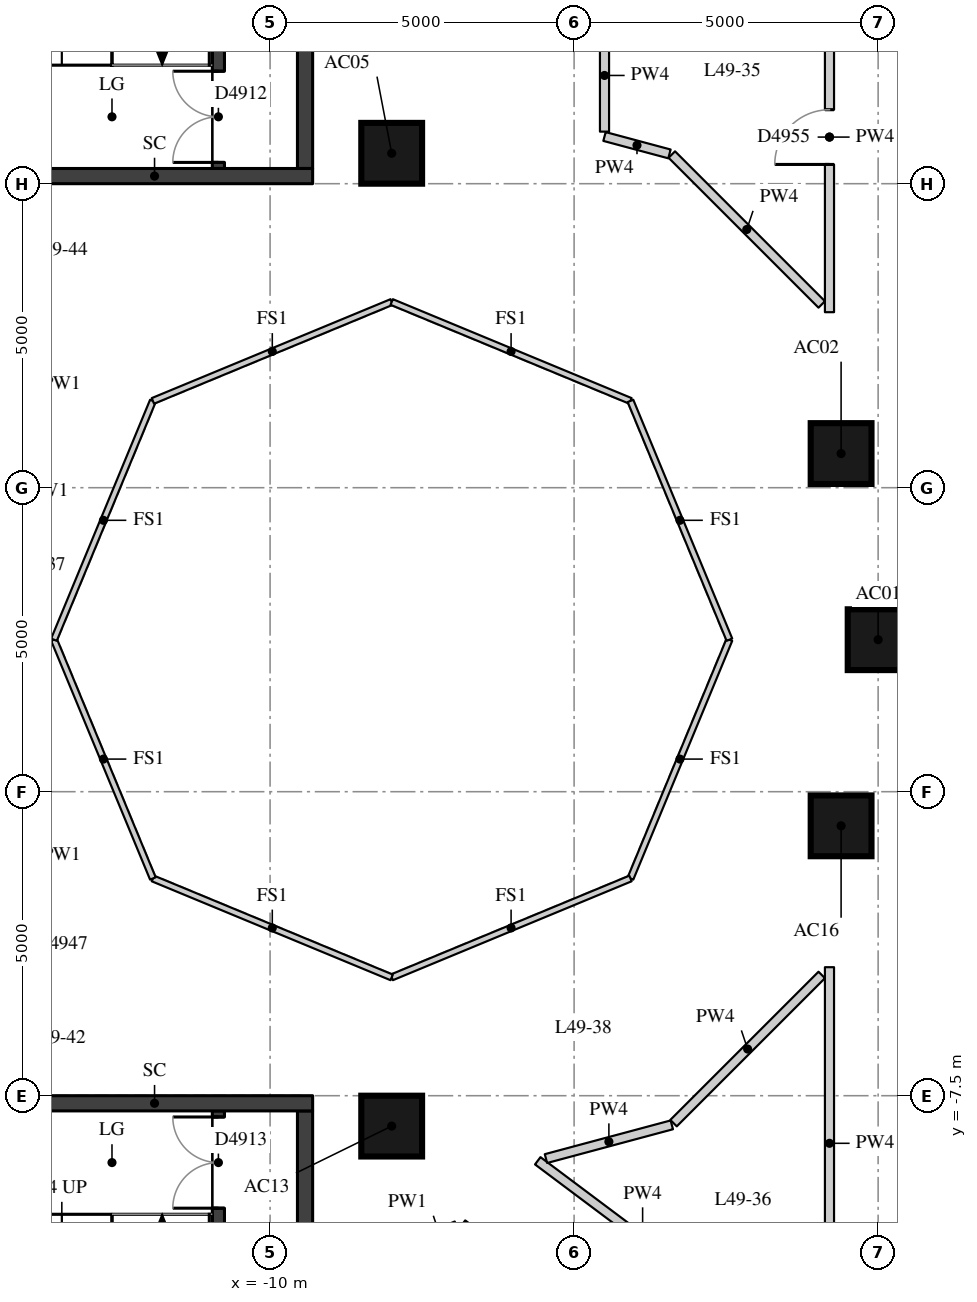
"""IFC4 building model, lengths in metres.
Left out: names, types, materials, properties, quantities, classifications, styles, units other than length and angle.
Written with IfcOpenShell. Run it as: python <this file> out.ifc"""

import sys

from ifc_helpers import new_model, si_unit, direction, frame, frame_2d, origin, origin_2d, place, context, subcontext, project, spatial, rectangle, extrude, element, fill, save


model = new_model("IFC4")
c1 = context("Model", 3, precision=1e-05, world=origin(), true_north=direction((0.0, 1.0)))
c2 = subcontext(c1, "Body", "Model", "MODEL_VIEW")
j1 = project(units=[si_unit("LENGTHUNIT", "METRE"), si_unit("PLANEANGLEUNIT", "RADIAN")], contexts=[c1])
p1 = place(None, origin())
s1 = spatial("IfcSite", under=j1, at=p1, CompositionType="ELEMENT")
p2 = place(p1, origin())
s2 = spatial("IfcBuilding", under=s1, at=p2, CompositionType="ELEMENT")
p3 = place(p2, frame((0.0, 0.0, 174.8)))
s3 = spatial("IfcBuildingStorey", under=s2, at=p3, CompositionType="ELEMENT", Elevation=174.8)
for number, where, z_axis, x_axis in (
    (1, (0.0, 0.0, 0.0), (0.0, 0.0, 1.0), (1.0, 0.0, 0.0)),
    (2, (-0.609, 3.062, 0.0), (0.0, 0.0, 1.0), (1.0, 0.0, 0.0)),
    (3, (-8.0, 8.0, 0.0), (0.0, 0.0, 1.0), (1.0, 0.0, 0.0)),
    (4, (-8.0, -8.0, 0.0), (0.0, 0.0, 1.0), (1.0, 0.0, 0.0)),
    (5, (-0.609, -3.062, 0.0), (0.0, 0.0, 1.0), (1.0, 0.0, 0.0)),
):
    element("IfcColumn", number, at=place(p3, frame(where, z_axis=z_axis, x_axis=x_axis)), inside=s3, PredefinedType="COLUMN", context=c2, shape_type="SweptSolid", body=[
        extrude(rectangle(XDim=1.0, YDim=1.0, at=origin_2d()), origin(), (0.0, 0.0, 1.0), 3.3),
    ])
p4 = place(p3, frame((-10.85, 7.75, 0.0), z_axis=(0.0, 0.0, 1.0), x_axis=(0.0, 1.0, 0.0)))
e6 = element("IfcWall", 6, at=p4, inside=s3, PredefinedType="SHEAR", context=c2, shape_type="SweptSolid", body=[
    extrude(rectangle(XDim=6.0, YDim=0.2, at=frame_2d((3.0, 0.0))), origin(), (0.0, 0.0, 1.0), 3.02),
])
p5 = place(p4, frame((0.1, 0.0, 0.0)))
e7 = element("IfcOpeningElement", 7, at=p5, cuts=e6, PredefinedType="OPENING", context=c2, shape_type="SweptSolid", body=[
    extrude(rectangle(XDim=1.5, YDim=2.1, at=frame_2d((0.75, 1.05))), frame((0.0, 0.11, 0.0), z_axis=(0.0, -1.0, 0.0), x_axis=(1.0, 0.0, 0.0)), (0.0, 0.0, 1.0), 0.22),
])
p6 = place(p3, frame((-10.85, -13.75, 0.0), z_axis=(0.0, 0.0, 1.0), x_axis=(0.0, 1.0, 0.0)))
e8 = element("IfcWall", 8, at=p6, inside=s3, PredefinedType="SHEAR", context=c2, shape_type="SweptSolid", body=[
    extrude(rectangle(XDim=6.0, YDim=0.2, at=frame_2d((3.0, 0.0))), origin(), (0.0, 0.0, 1.0), 3.02),
])
p7 = place(p6, frame((4.4, 0.0, 0.0)))
e9 = element("IfcOpeningElement", 9, at=p7, cuts=e8, PredefinedType="OPENING", context=c2, shape_type="SweptSolid", body=[
    extrude(rectangle(XDim=1.5, YDim=2.1, at=frame_2d((0.75, 1.05))), frame((0.0, 0.11, 0.0), z_axis=(0.0, -1.0, 0.0), x_axis=(1.0, 0.0, 0.0)), (0.0, 0.0, 1.0), 0.22),
])
p8 = place(p3, frame((-9.425, 7.75, -0.28), z_axis=(0.0, 0.0, 1.0), x_axis=(0.0, 1.0, 0.0)))
e10 = element("IfcWall", 10, at=p8, inside=s3, PredefinedType="SHEAR", context=c2, shape_type="SweptSolid", body=[
    extrude(rectangle(XDim=6.0, YDim=0.25, at=frame_2d((3.0, 0.0))), origin(), (0.0, 0.0, 1.0), 3.3),
])
p9 = place(p8, frame((2.1, 0.0, 0.28)))
e11 = element("IfcOpeningElement", 11, at=p9, cuts=e10, PredefinedType="OPENING", context=c2, shape_type="SweptSolid", body=[
    extrude(rectangle(XDim=1.5, YDim=2.1, at=frame_2d((0.75, 1.05))), frame((0.0, 0.135, 0.0), z_axis=(0.0, -1.0, 0.0), x_axis=(1.0, 0.0, 0.0)), (0.0, 0.0, 1.0), 0.27),
])
p10 = place(p3, frame((-14.5, 7.625, -0.28), z_axis=(0.0, 0.0, 1.0), x_axis=(1.0, 0.0, 0.0)))
e12 = element("IfcWall", 12, at=p10, inside=s3, PredefinedType="SHEAR", context=c2, shape_type="SweptSolid", body=[
    extrude(rectangle(XDim=5.2, YDim=0.25, at=frame_2d((2.6, 0.0))), origin(), (0.0, 0.0, 1.0), 3.3),
])
p11 = place(p3, frame((-9.425, -13.75, -0.28), z_axis=(0.0, 0.0, 1.0), x_axis=(0.0, 1.0, 0.0)))
e13 = element("IfcWall", 13, at=p11, inside=s3, PredefinedType="SHEAR", context=c2, shape_type="SweptSolid", body=[
    extrude(rectangle(XDim=6.0, YDim=0.25, at=frame_2d((3.0, 0.0))), origin(), (0.0, 0.0, 1.0), 3.3),
])
p12 = place(p11, frame((2.4, 0.0, 0.28)))
e14 = element("IfcOpeningElement", 14, at=p12, cuts=e13, PredefinedType="OPENING", context=c2, shape_type="SweptSolid", body=[
    extrude(rectangle(XDim=1.5, YDim=2.1, at=frame_2d((0.75, 1.05))), frame((0.0, 0.135, 0.0), z_axis=(0.0, -1.0, 0.0), x_axis=(1.0, 0.0, 0.0)), (0.0, 0.0, 1.0), 0.27),
])
p13 = place(p3, frame((-14.5, -7.625, -0.28), z_axis=(0.0, 0.0, 1.0), x_axis=(1.0, 0.0, 0.0)))
e15 = element("IfcWall", 15, at=p13, inside=s3, PredefinedType="SHEAR", context=c2, shape_type="SweptSolid", body=[
    extrude(rectangle(XDim=5.2, YDim=0.25, at=frame_2d((2.6, 0.0))), origin(), (0.0, 0.0, 1.0), 3.3),
])
p14 = place(p3, frame((-2.698, -12.744, 0.0), z_axis=(0.0, 0.0, 1.0), x_axis=(-0.800208812098, 0.59972148289, 0.0)))
e16 = element("IfcWall", 16, at=p14, inside=s3, PredefinedType="PARTITIONING", context=c2, shape_type="SweptSolid", body=[
    extrude(rectangle(XDim=5.19, YDim=0.2, at=frame_2d((2.595, 0.0))), origin(), (0.0, 0.0, 1.0), 3.02),
])
p15 = place(p3, frame((-6.925, -9.661, 0.0), z_axis=(0.0, 0.0, 1.0), x_axis=(-0.923725195793, -0.383055821855, 0.0)))
e17 = element("IfcWall", 17, at=p15, inside=s3, PredefinedType="PARTITIONING", context=c2, shape_type="SweptSolid", body=[
    extrude(rectangle(XDim=0.623, YDim=0.2, at=frame_2d((0.312, 0.0))), origin(), (0.0, 0.0, 1.0), 3.02),
])
p16 = place(p3, frame((-0.8, 11.147, 0.0), z_axis=(0.0, 0.0, 1.0), x_axis=(0.0, -1.0, 0.0)))
e18 = element("IfcWall", 18, at=p16, inside=s3, PredefinedType="PARTITIONING", context=c2, shape_type="SweptSolid", body=[
    extrude(rectangle(XDim=5.76, YDim=0.15, at=frame_2d((2.88, 0.0))), origin(), (0.0, 0.0, 1.0), 3.02),
])
p17 = place(p16, frame((2.43, 0.0, 0.0)))
e19 = element("IfcOpeningElement", 19, at=p17, cuts=e18, PredefinedType="OPENING", context=c2, shape_type="SweptSolid", body=[
    extrude(rectangle(XDim=0.9, YDim=2.1, at=frame_2d((0.45, 1.05))), frame((0.0, 0.085, 0.0), z_axis=(0.0, -1.0, 0.0), x_axis=(1.0, 0.0, 0.0)), (0.0, 0.0, 1.0), 0.17),
])
p18 = place(p3, frame((-0.927, 5.514, 0.0), z_axis=(0.0, 0.0, 1.0), x_axis=(-0.707106781187, 0.707106781187, 0.0)))
e20 = element("IfcWall", 20, at=p18, inside=s3, PredefinedType="PARTITIONING", context=c2, shape_type="SweptSolid", body=[
    extrude(rectangle(XDim=3.487, YDim=0.15, at=frame_2d((1.743, 0.0))), origin(), (0.0, 0.0, 1.0), 3.02),
])
p19 = place(p3, frame((-3.432, 7.99, 0.0), z_axis=(0.0, 0.0, 1.0), x_axis=(-0.965900750832, 0.258912609855, 0.0)))
e21 = element("IfcWall", 21, at=p19, inside=s3, PredefinedType="PARTITIONING", context=c2, shape_type="SweptSolid", body=[
    extrude(rectangle(XDim=1.106, YDim=0.15, at=frame_2d((0.553, 0.0))), origin(), (0.0, 0.0, 1.0), 3.02),
])
p20 = place(p3, frame((-4.5, 8.356, 0.0), z_axis=(0.0, 0.0, 1.0), x_axis=(0.0, 1.0, 0.0)))
e22 = element("IfcWall", 22, at=p20, inside=s3, PredefinedType="PARTITIONING", context=c2, shape_type="SweptSolid", body=[
    extrude(rectangle(XDim=1.848, YDim=0.15, at=frame_2d((0.924, 0.0))), origin(), (0.0, 0.0, 1.0), 3.02),
])
p21 = place(p3, frame((-0.8, -5.386, 0.0), z_axis=(0.0, 0.0, 1.0), x_axis=(0.0, -1.0, 0.0)))
e23 = element("IfcWall", 23, at=p21, inside=s3, PredefinedType="PARTITIONING", context=c2, shape_type="SweptSolid", body=[
    extrude(rectangle(XDim=5.793, YDim=0.15, at=frame_2d((2.896, 0.0))), origin(), (0.0, 0.0, 1.0), 3.02),
])
p22 = place(p3, frame((-2.148, -11.156, 0.0), z_axis=(0.0, 0.0, 1.0), x_axis=(-0.800210636755, 0.599719048241, 0.0)))
e24 = element("IfcWall", 24, at=p22, inside=s3, PredefinedType="PARTITIONING", context=c2, shape_type="SweptSolid", body=[
    extrude(rectangle(XDim=4.311, YDim=0.15, at=frame_2d((2.155, 0.0))), origin(), (0.0, 0.0, 1.0), 3.02),
])
p23 = place(p3, frame((-5.463, -8.534, 0.0), z_axis=(0.0, 0.0, 1.0), x_axis=(0.965888027346, 0.258960071498, 0.0)))
e25 = element("IfcWall", 25, at=p23, inside=s3, PredefinedType="PARTITIONING", context=c2, shape_type="SweptSolid", body=[
    extrude(rectangle(XDim=2.143, YDim=0.15, at=frame_2d((1.071, 0.0))), origin(), (0.0, 0.0, 1.0), 3.02),
])
p24 = place(p3, frame((-3.365, -7.951, 0.0), z_axis=(0.0, 0.0, 1.0), x_axis=(0.707106781187, 0.707106781187, 0.0)))
e26 = element("IfcWall", 26, at=p24, inside=s3, PredefinedType="PARTITIONING", context=c2, shape_type="SweptSolid", body=[
    extrude(rectangle(XDim=3.447, YDim=0.15, at=frame_2d((1.723, 0.0))), origin(), (0.0, 0.0, 1.0), 3.02),
])
for number, where, z_axis, x_axis in (
    (27, (-2.446, 0.0, 0.0), (0.0, 0.0, 1.0), (-0.383, -0.924, 0.0)),
    (28, (-4.073, -3.927, 0.0), (0.0, 0.0, 1.0), (-0.924, -0.383, 0.0)),
    (29, (-8.0, -5.554, 0.0), (0.0, 0.0, 1.0), (-0.924, 0.383, 0.0)),
    (30, (-11.927, -3.927, 0.0), (0.0, 0.0, 1.0), (-0.383, 0.924, 0.0)),
    (31, (-13.554, 0.0, 0.0), (0.0, 0.0, 1.0), (0.383, 0.924, 0.0)),
    (32, (-11.927, 3.927, 0.0), (0.0, 0.0, 1.0), (0.924, 0.383, 0.0)),
    (33, (-8.0, 5.554, 0.0), (0.0, 0.0, 1.0), (0.924, -0.383, 0.0)),
    (34, (-4.073, 3.927, 0.0), (0.0, 0.0, 1.0), (0.383, -0.924, 0.0)),
):
    element("IfcWall", number, at=place(p3, frame(where, z_axis=z_axis, x_axis=x_axis)), inside=s3, PredefinedType="PARTITIONING", context=c2, shape_type="SweptSolid", body=[
        extrude(rectangle(XDim=4.251, YDim=0.1, at=frame_2d((2.125, 0.0))), origin(), (0.0, 0.0, 1.0), 3.02),
    ])
p25 = place(p5, origin())
e35 = element("IfcDoor", 35, at=p25, inside=s3, OperationType="DOUBLE_DOOR_SINGLE_SWING", PredefinedType="DOOR", context=c2, shape_type="SweptSolid", body=[
    extrude(rectangle(XDim=1.5, YDim=2.1, at=frame_2d((0.75, 1.05))), frame((0.0, 0.025, 0.0), z_axis=(0.0, -1.0, 0.0), x_axis=(1.0, 0.0, 0.0)), (0.0, 0.0, 1.0), 0.05),
])
fill(e7, e35)
p26 = place(p7, origin())
e36 = element("IfcDoor", 36, at=p26, inside=s3, OperationType="DOUBLE_DOOR_SINGLE_SWING", PredefinedType="DOOR", context=c2, shape_type="SweptSolid", body=[
    extrude(rectangle(XDim=1.5, YDim=2.1, at=frame_2d((0.75, 1.05))), frame((0.0, 0.025, 0.0), z_axis=(0.0, -1.0, 0.0), x_axis=(1.0, 0.0, 0.0)), (0.0, 0.0, 1.0), 0.05),
])
fill(e9, e36)
p27 = place(p17, origin())
e37 = element("IfcDoor", 37, at=p27, inside=s3, OperationType="SINGLE_SWING_LEFT", PredefinedType="DOOR", context=c2, shape_type="SweptSolid", body=[
    extrude(rectangle(XDim=0.9, YDim=2.1, at=frame_2d((0.45, 1.05))), frame((0.0, 0.025, 0.0), z_axis=(0.0, -1.0, 0.0), x_axis=(1.0, 0.0, 0.0)), (0.0, 0.0, 1.0), 0.05),
])
fill(e19, e37)
save(model, sys.argv[1])
